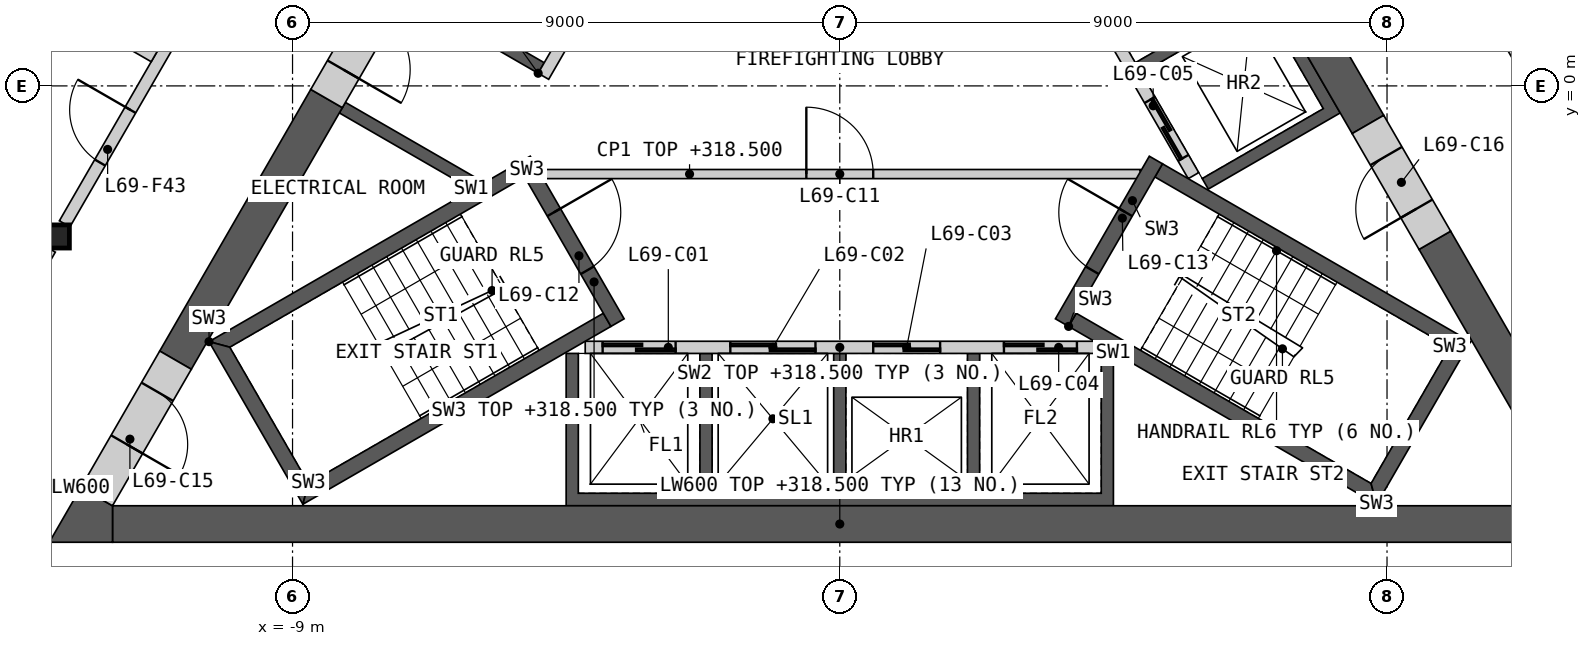
"""IFC4 building model, lengths in metres.
Left out: names, types, materials, properties, quantities, classifications, styles, units other than length and angle.
Written with IfcOpenShell. Run it as: python <this file> out.ifc"""

import sys

from ifc_helpers import new_model, si_unit, direction, frame, frame_2d, origin, origin_2d, place, context, subcontext, project, spatial, polyline, rectangle, i_section, outline, extrude, element, fill, save


model = new_model("IFC4")
c1 = context("Model", 3, precision=1e-05, world=origin(), true_north=direction((0.0, 1.0)))
c2 = subcontext(c1, "Body", "Model", "MODEL_VIEW")
j1 = project(units=[si_unit("LENGTHUNIT", "METRE"), si_unit("PLANEANGLEUNIT", "RADIAN")], contexts=[c1])
p1 = place(None, origin())
s1 = spatial("IfcSite", under=j1, at=p1, CompositionType="ELEMENT")
p2 = place(p1, origin())
s2 = spatial("IfcBuilding", under=s1, at=p2, CompositionType="ELEMENT")
p3 = place(p2, frame((0.0, 0.0, 315.4)))
s3 = spatial("IfcBuildingStorey", under=s2, at=p3, CompositionType="ELEMENT", Elevation=315.4)
p4 = place(p3, frame((-12.868, -2.476, 0.0), z_axis=(0.0, 0.0, 1.0), x_axis=(1.0, 0.0, 0.0)))
e1 = element("IfcColumn", 1, at=p4, inside=s3, PredefinedType="COLUMN", context=c2, shape_type="SweptSolid", body=[
    extrude(i_section(OverallWidth=0.396, OverallDepth=0.381, WebThickness=0.019, FlangeThickness=0.03, at=origin_2d()), origin(), (0.0, 0.0, 1.0), 3.4),
])
p5 = place(p3, origin())
e2 = element("IfcWall", 2, at=p5, inside=s3, PredefinedType="SHEAR", context=c2, shape_type="SweptSolid", body=[
    extrude(outline(polyline([(4.5, -4.4), (4.5, -6.906), (-4.5, -6.906), (-4.5, -4.4), (-4.3, -4.4), (-4.3, -6.7), (-2.3, -6.7), (-2.3, -4.4), (-2.1, -4.4), (-2.1, -6.7), (-0.1, -6.7), (-0.1, -4.4), (0.1, -4.4), (0.1, -6.7), (2.1, -6.7), (2.1, -4.4), (2.3, -4.4), (2.3, -6.7), (4.3, -6.7), (4.3, -4.4), (4.5, -4.4)])), origin(), (0.0, 0.0, 1.0), 3.1),
])
p6 = place(p3, frame((-4.187, -4.3, 0.0), z_axis=(0.0, 0.0, 1.0), x_axis=(1.0, 0.0, 0.0)))
e3 = element("IfcWall", 3, at=p6, inside=s3, PredefinedType="SOLIDWALL", context=c2, shape_type="SweptSolid", body=[
    extrude(rectangle(XDim=8.373, YDim=0.2, at=frame_2d((4.187, 0.0))), origin(), (0.0, 0.0, 1.0), 3.1),
])
p7 = place(p6, frame((0.287, 0.0, 0.0)))
e4 = element("IfcOpeningElement", 4, at=p7, cuts=e3, PredefinedType="OPENING", context=c2, shape_type="SweptSolid", body=[
    extrude(rectangle(XDim=1.2, YDim=2.1, at=frame_2d((0.6, 1.05))), frame((0.0, 0.11, 0.0), z_axis=(0.0, -1.0, 0.0), x_axis=(1.0, 0.0, 0.0)), (0.0, 0.0, 1.0), 0.22),
])
p8 = place(p6, frame((2.387, 0.0, 0.0)))
e5 = element("IfcOpeningElement", 5, at=p8, cuts=e3, PredefinedType="OPENING", context=c2, shape_type="SweptSolid", body=[
    extrude(rectangle(XDim=1.4, YDim=2.1, at=frame_2d((0.7, 1.05))), frame((0.0, 0.11, 0.0), z_axis=(0.0, -1.0, 0.0), x_axis=(1.0, 0.0, 0.0)), (0.0, 0.0, 1.0), 0.22),
])
p9 = place(p6, frame((4.737, 0.0, 0.0)))
e6 = element("IfcOpeningElement", 6, at=p9, cuts=e3, PredefinedType="OPENING", context=c2, shape_type="SweptSolid", body=[
    extrude(rectangle(XDim=1.1, YDim=2.1, at=frame_2d((0.55, 1.05))), frame((0.0, 0.11, 0.0), z_axis=(0.0, -1.0, 0.0), x_axis=(1.0, 0.0, 0.0)), (0.0, 0.0, 1.0), 0.22),
])
p10 = place(p6, frame((6.887, 0.0, 0.0)))
e7 = element("IfcOpeningElement", 7, at=p10, cuts=e3, PredefinedType="OPENING", context=c2, shape_type="SweptSolid", body=[
    extrude(rectangle(XDim=1.2, YDim=2.1, at=frame_2d((0.6, 1.05))), frame((0.0, 0.11, 0.0), z_axis=(0.0, -1.0, 0.0), x_axis=(1.0, 0.0, 0.0)), (0.0, 0.0, 1.0), 0.22),
])
p11 = place(p3, origin())
e8 = element("IfcWall", 8, at=p11, inside=s3, PredefinedType="SHEAR", context=c2, shape_type="SweptSolid", body=[
    extrude(outline(polyline([(1.561, 6.097), (3.731, 7.35), (8.231, -0.444), (6.061, -1.697), (5.96, -1.524), (7.952, -0.374), (6.952, 1.358), (4.96, 0.208), (4.861, 0.381), (6.852, 1.531), (5.852, 3.263), (3.861, 2.113), (3.76, 2.287), (5.752, 3.437), (4.752, 5.169), (2.76, 4.019), (2.66, 4.192), (4.652, 5.342), (3.652, 7.074), (1.66, 5.924), (1.561, 6.097)])), origin(), (0.0, 0.0, 1.0), 3.1),
])
p12 = place(p3, frame((5.817, -1.476, 0.0), z_axis=(0.0, 0.0, 1.0), x_axis=(-0.500002616675, 0.866023893041, 0.0)))
e9 = element("IfcWall", 9, at=p12, inside=s3, PredefinedType="SOLIDWALL", context=c2, shape_type="SweptSolid", body=[
    extrude(rectangle(XDim=8.373, YDim=0.2, at=frame_2d((4.187, 0.0))), origin(), (0.0, 0.0, 1.0), 3.1),
])
p13 = place(p12, frame((0.337, 0.0, 0.0)))
e10 = element("IfcOpeningElement", 10, at=p13, cuts=e9, PredefinedType="OPENING", context=c2, shape_type="SweptSolid", body=[
    extrude(rectangle(XDim=1.1, YDim=2.1, at=frame_2d((0.55, 1.05))), frame((0.0, 0.11, 0.0), z_axis=(0.0, -1.0, 0.0), x_axis=(1.0, 0.0, 0.0)), (0.0, 0.0, 1.0), 0.22),
])
p14 = place(p12, frame((2.537, 0.0, 0.0)))
e11 = element("IfcOpeningElement", 11, at=p14, cuts=e9, PredefinedType="OPENING", context=c2, shape_type="SweptSolid", body=[
    extrude(rectangle(XDim=1.1, YDim=2.1, at=frame_2d((0.55, 1.05))), frame((0.0, 0.11, 0.0), z_axis=(0.0, -1.0, 0.0), x_axis=(1.0, 0.0, 0.0)), (0.0, 0.0, 1.0), 0.22),
])
p15 = place(p12, frame((4.737, 0.0, 0.0)))
e12 = element("IfcOpeningElement", 12, at=p15, cuts=e9, PredefinedType="OPENING", context=c2, shape_type="SweptSolid", body=[
    extrude(rectangle(XDim=1.1, YDim=2.1, at=frame_2d((0.55, 1.05))), frame((0.0, 0.11, 0.0), z_axis=(0.0, -1.0, 0.0), x_axis=(1.0, 0.0, 0.0)), (0.0, 0.0, 1.0), 0.22),
])
p16 = place(p12, frame((7.037, 0.0, 0.0)))
e13 = element("IfcOpeningElement", 13, at=p16, cuts=e9, PredefinedType="OPENING", context=c2, shape_type="SweptSolid", body=[
    extrude(rectangle(XDim=0.9, YDim=2.1, at=frame_2d((0.45, 1.05))), frame((0.0, 0.11, 0.0), z_axis=(0.0, -1.0, 0.0), x_axis=(1.0, 0.0, 0.0)), (0.0, 0.0, 1.0), 0.22),
])
p17 = place(p3, origin())
e14 = element("IfcWall", 14, at=p17, inside=s3, PredefinedType="SHEAR", context=c2, shape_type="SweptSolid", body=[
    extrude(outline(polyline([(-6.061, -1.697), (-8.231, -0.444), (-8.131, -0.271), (-5.96, -1.524), (-6.061, -1.697)])), origin(), (0.0, 0.0, 1.0), 3.1),
])
p18 = place(p3, origin())
e15 = element("IfcWall", 15, at=p18, inside=s3, PredefinedType="SHEAR", context=c2, shape_type="SweptSolid", body=[
    extrude(outline(polyline([(-4.96, 0.208), (-7.131, 1.461), (-3.731, 7.35), (-1.561, 6.097), (-1.66, 5.924), (-3.652, 7.074), (-5.752, 3.437), (-3.76, 2.287), (-3.861, 2.113), (-5.852, 3.263), (-6.852, 1.531), (-4.861, 0.381), (-4.96, 0.208)])), origin(), (0.0, 0.0, 1.0), 3.1),
])
p19 = place(p3, frame((-1.631, 5.776, 0.0), z_axis=(0.0, 0.0, 1.0), x_axis=(-0.499992876559, -0.866029516466, 0.0)))
e16 = element("IfcWall", 16, at=p19, inside=s3, PredefinedType="SOLIDWALL", context=c2, shape_type="SweptSolid", body=[
    extrude(rectangle(XDim=6.486, YDim=0.2, at=frame_2d((3.243, 0.0))), origin(), (0.0, 0.0, 1.0), 3.1),
])
p20 = place(p19, frame((1.537, 0.0, 0.0)))
e17 = element("IfcOpeningElement", 17, at=p20, cuts=e16, PredefinedType="OPENING", context=c2, shape_type="SweptSolid", body=[
    extrude(rectangle(XDim=0.9, YDim=2.1, at=frame_2d((0.45, 1.05))), frame((0.0, 0.11, 0.0), z_axis=(0.0, -1.0, 0.0), x_axis=(1.0, 0.0, 0.0)), (0.0, 0.0, 1.0), 0.22),
])
p21 = place(p19, frame((4.837, 0.0, 0.0)))
e18 = element("IfcOpeningElement", 18, at=p21, cuts=e16, PredefinedType="OPENING", context=c2, shape_type="SweptSolid", body=[
    extrude(rectangle(XDim=0.9, YDim=2.1, at=frame_2d((0.45, 1.05))), frame((0.0, 0.11, 0.0), z_axis=(0.0, -1.0, 0.0), x_axis=(1.0, 0.0, 0.0)), (0.0, 0.0, 1.0), 0.22),
])
p22 = place(p3, frame((-4.941, -1.45, 0.0), z_axis=(0.0, 0.0, 1.0), x_axis=(1.0, 0.0, 0.0)))
e19 = element("IfcWall", 19, at=p22, inside=s3, PredefinedType="PARTITIONING", context=c2, shape_type="SweptSolid", body=[
    extrude(rectangle(XDim=9.882, YDim=0.15, at=frame_2d((4.941, 0.0))), origin(), (0.0, 0.0, 1.0), 3.1),
])
p23 = place(p22, frame((4.391, 0.0, 0.0)))
e20 = element("IfcOpeningElement", 20, at=p23, cuts=e19, PredefinedType="OPENING", context=c2, shape_type="SweptSolid", body=[
    extrude(rectangle(XDim=1.1, YDim=2.1, at=frame_2d((0.55, 1.05))), frame((0.0, 0.085, 0.0), z_axis=(0.0, -1.0, 0.0), x_axis=(1.0, 0.0, 0.0)), (0.0, 0.0, 1.0), 0.17),
])
p24 = place(p3, origin())
e21 = element("IfcWall", 21, at=p24, inside=s3, PredefinedType="SHEAR", context=c2, shape_type="SweptSolid", body=[
    extrude(outline(polyline([(-5.307, -1.281), (-10.374, -4.206), (-10.032, -4.298), (-5.182, -1.498), (-5.307, -1.281)])), origin(), (0.0, 0.0, 1.0), 3.1),
])
p25 = place(p3, origin())
e22 = element("IfcWall", 22, at=p25, inside=s3, PredefinedType="SHEAR", context=c2, shape_type="SweptSolid", body=[
    extrude(outline(polyline([(-10.374, -4.206), (-8.83, -6.881), (-8.738, -6.539), (-10.032, -4.298), (-10.374, -4.206)])), origin(), (0.0, 0.0, 1.0), 3.1),
])
p26 = place(p3, origin())
e23 = element("IfcWall", 23, at=p26, inside=s3, PredefinedType="SHEAR", context=c2, shape_type="SweptSolid", body=[
    extrude(outline(polyline([(-8.738, -6.539), (-8.83, -6.881), (-3.763, -3.956), (-3.888, -3.739), (-8.738, -6.539)])), origin(), (0.0, 0.0, 1.0), 3.1),
])
p27 = place(p3, frame((-5.199, -1.219, 0.0), z_axis=(0.0, 0.0, 1.0), x_axis=(0.499982516597, -0.866035497597, 0.0)))
e24 = element("IfcWall", 24, at=p27, inside=s3, PredefinedType="SHEAR", context=c2, shape_type="SweptSolid", body=[
    extrude(rectangle(XDim=3.088, YDim=0.25, at=frame_2d((1.544, 0.0))), origin(), (0.0, 0.0, 1.0), 3.1),
])
p28 = place(p27, frame((0.994, 0.0, 0.0)))
e25 = element("IfcOpeningElement", 25, at=p28, cuts=e24, PredefinedType="OPENING", context=c2, shape_type="SweptSolid", body=[
    extrude(rectangle(XDim=1.1, YDim=2.1, at=frame_2d((0.55, 1.05))), frame((0.0, 0.135, 0.0), z_axis=(0.0, -1.0, 0.0), x_axis=(1.0, 0.0, 0.0)), (0.0, 0.0, 1.0), 0.27),
])
p29 = place(p3, origin())
e26 = element("IfcWall", 26, at=p29, inside=s3, PredefinedType="SHEAR", context=c2, shape_type="SweptSolid", body=[
    extrude(outline(polyline([(3.763, -3.956), (8.83, -6.881), (8.738, -6.539), (3.888, -3.739), (3.763, -3.956)])), origin(), (0.0, 0.0, 1.0), 3.1),
])
p30 = place(p3, origin())
e27 = element("IfcWall", 27, at=p30, inside=s3, PredefinedType="SHEAR", context=c2, shape_type="SweptSolid", body=[
    extrude(outline(polyline([(8.83, -6.881), (10.374, -4.206), (10.032, -4.298), (8.738, -6.539), (8.83, -6.881)])), origin(), (0.0, 0.0, 1.0), 3.1),
])
p31 = place(p3, origin())
e28 = element("IfcWall", 28, at=p31, inside=s3, PredefinedType="SHEAR", context=c2, shape_type="SweptSolid", body=[
    extrude(outline(polyline([(10.032, -4.298), (10.374, -4.206), (5.307, -1.281), (5.182, -1.498), (10.032, -4.298)])), origin(), (0.0, 0.0, 1.0), 3.1),
])
p32 = place(p3, frame((3.655, -3.893, 0.0), z_axis=(0.0, 0.0, 1.0), x_axis=(0.499982516597, 0.866035497597, 0.0)))
e29 = element("IfcWall", 29, at=p32, inside=s3, PredefinedType="SHEAR", context=c2, shape_type="SweptSolid", body=[
    extrude(rectangle(XDim=3.088, YDim=0.25, at=frame_2d((1.544, 0.0))), origin(), (0.0, 0.0, 1.0), 3.1),
])
p33 = place(p32, frame((0.994, 0.0, 0.0)))
e30 = element("IfcOpeningElement", 30, at=p33, cuts=e29, PredefinedType="OPENING", context=c2, shape_type="SweptSolid", body=[
    extrude(rectangle(XDim=1.1, YDim=2.1, at=frame_2d((0.55, 1.05))), frame((0.0, 0.135, 0.0), z_axis=(0.0, -1.0, 0.0), x_axis=(1.0, 0.0, 0.0)), (0.0, 0.0, 1.0), 0.27),
])
p34 = place(p3, frame((-11.961, -7.206, 0.0), z_axis=(0.0, 0.0, 1.0), x_axis=(1.0, 0.0, 0.0)))
e31 = element("IfcWall", 31, at=p34, inside=s3, PredefinedType="SHEAR", context=c2, shape_type="SweptSolid", body=[
    extrude(rectangle(XDim=23.921, YDim=0.6, at=frame_2d((11.961, 0.0))), origin(), (0.0, 0.0, 1.0), 3.1),
])
p35 = place(p3, frame((8.686, -0.634, 0.0), z_axis=(0.0, 0.0, 1.0), x_axis=(-0.50001836461, 0.866014800712, 0.0)))
e32 = element("IfcWall", 32, at=p35, inside=s3, PredefinedType="SHEAR", context=c2, shape_type="SweptSolid", body=[
    extrude(rectangle(XDim=10.451, YDim=0.6, at=frame_2d((5.225, 0.0))), origin(), (0.0, 0.0, 1.0), 3.1),
])
p36 = place(p3, frame((12.221, -6.756, 0.0), z_axis=(0.0, 0.0, 1.0), x_axis=(-0.50000604952, 0.866021911064, 0.0)))
e33 = element("IfcWall", 33, at=p36, inside=s3, PredefinedType="SHEAR", context=c2, shape_type="SweptSolid", body=[
    extrude(rectangle(XDim=4.869, YDim=0.6, at=frame_2d((2.434, 0.0))), origin(), (0.0, 0.0, 1.0), 3.1),
])
p37 = place(p3, frame((-8.44, -0.208, 0.0), z_axis=(0.0, 0.0, 1.0), x_axis=(-0.500007425856, -0.866021116422, 0.0)))
e34 = element("IfcWall", 34, at=p37, inside=s3, PredefinedType="SHEAR", context=c2, shape_type="SweptSolid", body=[
    extrude(rectangle(XDim=4.969, YDim=0.6, at=frame_2d((2.484, 0.0))), origin(), (0.0, 0.0, 1.0), 3.1),
])
p38 = place(p3, origin())
e35 = element("IfcWall", 35, at=p38, inside=s3, PredefinedType="SHEAR", context=c2, shape_type="SweptSolid", body=[
    extrude(outline(polyline([(-12.48, -6.606), (-11.961, -6.906), (-11.961, -7.506), (-13.0, -7.506), (-12.48, -6.606)])), origin(), (0.0, 0.0, 1.0), 3.1),
])
p39 = place(p3, frame((-10.925, -4.511, 0.0), z_axis=(0.0, 0.0, 1.0), x_axis=(-0.500018667571, -0.866014625789, 0.0)))
e36 = element("IfcWall", 36, at=p39, inside=s3, PredefinedType="SHEAR", context=c2, shape_type="SweptSolid", body=[
    extrude(rectangle(XDim=2.592, YDim=0.6, at=frame_2d((1.296, 0.0))), origin(), (0.0, 0.0, 1.0), 3.1),
])
p40 = place(p39, frame((0.6, 0.0, 0.0)))
e37 = element("IfcOpeningElement", 37, at=p40, cuts=e36, PredefinedType="OPENING", context=c2, shape_type="SweptSolid", body=[
    extrude(rectangle(XDim=1.0, YDim=2.1, at=frame_2d((0.5, 1.05))), frame((0.0, 0.31, 0.0), z_axis=(0.0, -1.0, 0.0), x_axis=(1.0, 0.0, 0.0)), (0.0, 0.0, 1.0), 0.62),
])
p41 = place(p3, frame((9.786, -2.539, 0.0), z_axis=(0.0, 0.0, 1.0), x_axis=(-0.499981787252, 0.866035918664, 0.0)))
e38 = element("IfcWall", 38, at=p41, inside=s3, PredefinedType="SHEAR", context=c2, shape_type="SweptSolid", body=[
    extrude(rectangle(XDim=2.2, YDim=0.6, at=frame_2d((1.1, 0.0))), origin(), (0.0, 0.0, 1.0), 3.1),
])
p42 = place(p41, frame((0.6, 0.0, 0.0)))
e39 = element("IfcOpeningElement", 39, at=p42, cuts=e38, PredefinedType="OPENING", context=c2, shape_type="SweptSolid", body=[
    extrude(rectangle(XDim=1.0, YDim=2.1, at=frame_2d((0.5, 1.05))), frame((0.0, 0.31, 0.0), z_axis=(0.0, -1.0, 0.0), x_axis=(1.0, 0.0, 0.0)), (0.0, 0.0, 1.0), 0.62),
])
p43 = place(p3, frame((-7.34, 1.698, 0.0), z_axis=(0.0, 0.0, 1.0), x_axis=(-0.50002983664, -0.866008176907, 0.0)))
e40 = element("IfcWall", 40, at=p43, inside=s3, PredefinedType="SHEAR", context=c2, shape_type="SweptSolid", body=[
    extrude(rectangle(XDim=2.2, YDim=0.6, at=frame_2d((1.1, 0.0))), origin(), (0.0, 0.0, 1.0), 3.1),
])
p44 = place(p43, frame((0.55, 0.0, 0.0)))
e41 = element("IfcOpeningElement", 41, at=p44, cuts=e40, PredefinedType="OPENING", context=c2, shape_type="SweptSolid", body=[
    extrude(rectangle(XDim=1.1, YDim=2.1, at=frame_2d((0.55, 1.05))), frame((0.0, 0.31, 0.0), z_axis=(0.0, -1.0, 0.0), x_axis=(1.0, 0.0, 0.0)), (0.0, 0.0, 1.0), 0.62),
])
p45 = place(p3, frame((8.698, 4.745, 0.0), z_axis=(0.0, 0.0, 1.0), x_axis=(0.499984266882, -0.866034487114, 0.0)))
e42 = element("IfcWall", 42, at=p45, inside=s3, PredefinedType="PARTITIONING", context=c2, shape_type="SweptSolid", body=[
    extrude(rectangle(XDim=8.099, YDim=0.2, at=frame_2d((4.049, 0.0))), origin(), (0.0, 0.0, 1.0), 3.1),
])
p46 = place(p3, frame((-12.748, -2.269, 0.0), z_axis=(0.0, 0.0, 1.0), x_axis=(0.499984266882, 0.866034487114, 0.0)))
e43 = element("IfcWall", 43, at=p46, inside=s3, PredefinedType="PARTITIONING", context=c2, shape_type="SweptSolid", body=[
    extrude(rectangle(XDim=8.099, YDim=0.2, at=frame_2d((4.049, 0.0))), origin(), (0.0, 0.0, 1.0), 3.1),
])
p47 = place(p46, frame((1.164, 0.0, 0.0)))
e44 = element("IfcOpeningElement", 44, at=p47, cuts=e43, PredefinedType="OPENING", context=c2, shape_type="SweptSolid", body=[
    extrude(rectangle(XDim=1.0, YDim=2.1, at=frame_2d((0.5, 1.05))), frame((0.0, 0.11, 0.0), z_axis=(0.0, -1.0, 0.0), x_axis=(1.0, 0.0, 0.0)), (0.0, 0.0, 1.0), 0.22),
])
p48 = place(p3, frame((-16.055, 3.273, 0.0), z_axis=(0.0, 0.0, 1.0), x_axis=(0.866019581949, -0.500010083578, 0.0)))
e45 = element("IfcWall", 45, at=p48, inside=s3, PredefinedType="PARTITIONING", context=c2, shape_type="SweptSolid", body=[
    extrude(rectangle(XDim=5.535, YDim=0.25, at=frame_2d((2.768, 0.0))), origin(), (0.0, 0.0, 1.0), 2.33),
])
p49 = place(p3, frame((-15.131, -6.397, 0.0), z_axis=(0.0, 0.0, 1.0), x_axis=(0.500003406062, 0.866023437285, 0.0)))
e46 = element("IfcWall", 46, at=p49, inside=s3, PredefinedType="PARTITIONING", context=c2, shape_type="SweptSolid", body=[
    extrude(rectangle(XDim=4.288, YDim=0.2, at=frame_2d((2.144, 0.0))), origin(), (0.0, 0.0, 1.0), 3.1),
])
p50 = place(p7, origin())
e47 = element("IfcDoor", 47, at=p50, inside=s3, OperationType="SLIDING_TO_LEFT", PredefinedType="DOOR", context=c2, shape_type="SweptSolid", body=[
    extrude(rectangle(XDim=1.2, YDim=2.1, at=frame_2d((0.6, 1.05))), frame((0.0, 0.025, 0.0), z_axis=(0.0, -1.0, 0.0), x_axis=(1.0, 0.0, 0.0)), (0.0, 0.0, 1.0), 0.05),
])
fill(e4, e47)
p51 = place(p8, origin())
e48 = element("IfcDoor", 48, at=p51, inside=s3, OperationType="SLIDING_TO_LEFT", PredefinedType="DOOR", context=c2, shape_type="SweptSolid", body=[
    extrude(rectangle(XDim=1.4, YDim=2.1, at=frame_2d((0.7, 1.05))), frame((0.0, 0.025, 0.0), z_axis=(0.0, -1.0, 0.0), x_axis=(1.0, 0.0, 0.0)), (0.0, 0.0, 1.0), 0.05),
])
fill(e5, e48)
p52 = place(p9, origin())
e49 = element("IfcDoor", 49, at=p52, inside=s3, OperationType="SLIDING_TO_LEFT", PredefinedType="DOOR", context=c2, shape_type="SweptSolid", body=[
    extrude(rectangle(XDim=1.1, YDim=2.1, at=frame_2d((0.55, 1.05))), frame((0.0, 0.025, 0.0), z_axis=(0.0, -1.0, 0.0), x_axis=(1.0, 0.0, 0.0)), (0.0, 0.0, 1.0), 0.05),
])
fill(e6, e49)
p53 = place(p10, origin())
e50 = element("IfcDoor", 50, at=p53, inside=s3, OperationType="SLIDING_TO_LEFT", PredefinedType="DOOR", context=c2, shape_type="SweptSolid", body=[
    extrude(rectangle(XDim=1.2, YDim=2.1, at=frame_2d((0.6, 1.05))), frame((0.0, 0.025, 0.0), z_axis=(0.0, -1.0, 0.0), x_axis=(1.0, 0.0, 0.0)), (0.0, 0.0, 1.0), 0.05),
])
fill(e7, e50)
p54 = place(p13, origin())
e51 = element("IfcDoor", 51, at=p54, inside=s3, OperationType="SLIDING_TO_LEFT", PredefinedType="DOOR", context=c2, shape_type="SweptSolid", body=[
    extrude(rectangle(XDim=1.1, YDim=2.1, at=frame_2d((0.55, 1.05))), frame((0.0, 0.025, 0.0), z_axis=(0.0, -1.0, 0.0), x_axis=(1.0, 0.0, 0.0)), (0.0, 0.0, 1.0), 0.05),
])
fill(e10, e51)
p55 = place(p23, origin())
e52 = element("IfcDoor", 52, at=p55, inside=s3, OperationType="SINGLE_SWING_LEFT", PredefinedType="DOOR", context=c2, shape_type="SweptSolid", body=[
    extrude(rectangle(XDim=1.1, YDim=2.1, at=frame_2d((0.55, 1.05))), frame((0.0, 0.025, 0.0), z_axis=(0.0, -1.0, 0.0), x_axis=(1.0, 0.0, 0.0)), (0.0, 0.0, 1.0), 0.05),
])
fill(e20, e52)
p56 = place(p28, origin())
e53 = element("IfcDoor", 53, at=p56, inside=s3, OperationType="SINGLE_SWING_LEFT", PredefinedType="DOOR", context=c2, shape_type="SweptSolid", body=[
    extrude(rectangle(XDim=1.1, YDim=2.1, at=frame_2d((0.55, 1.05))), frame((0.0, 0.025, 0.0), z_axis=(0.0, -1.0, 0.0), x_axis=(1.0, 0.0, 0.0)), (0.0, 0.0, 1.0), 0.05),
])
fill(e25, e53)
p57 = place(p33, origin())
e54 = element("IfcDoor", 54, at=p57, inside=s3, OperationType="SINGLE_SWING_RIGHT", PredefinedType="DOOR", context=c2, shape_type="SweptSolid", body=[
    extrude(rectangle(XDim=1.1, YDim=2.1, at=frame_2d((0.55, 1.05))), frame((0.0, 0.025, 0.0), z_axis=(0.0, -1.0, 0.0), x_axis=(1.0, 0.0, 0.0)), (0.0, 0.0, 1.0), 0.05),
])
fill(e30, e54)
p58 = place(p40, origin())
e55 = element("IfcDoor", 55, at=p58, inside=s3, OperationType="SINGLE_SWING_RIGHT", PredefinedType="DOOR", context=c2, shape_type="SweptSolid", body=[
    extrude(rectangle(XDim=1.0, YDim=2.1, at=frame_2d((0.5, 1.05))), frame((0.0, 0.055, 0.0), z_axis=(0.0, -1.0, 0.0), x_axis=(1.0, 0.0, 0.0)), (0.0, 0.0, 1.0), 0.05),
])
fill(e37, e55)
p59 = place(p42, origin())
e56 = element("IfcDoor", 56, at=p59, inside=s3, OperationType="SINGLE_SWING_LEFT", PredefinedType="DOOR", context=c2, shape_type="SweptSolid", body=[
    extrude(rectangle(XDim=1.0, YDim=2.1, at=frame_2d((0.5, 1.05))), frame((0.0, 0.055, 0.0), z_axis=(0.0, -1.0, 0.0), x_axis=(1.0, 0.0, 0.0)), (0.0, 0.0, 1.0), 0.05),
])
fill(e39, e56)
p60 = place(p44, origin())
e57 = element("IfcDoor", 57, at=p60, inside=s3, OperationType="SINGLE_SWING_RIGHT", PredefinedType="DOOR", context=c2, shape_type="SweptSolid", body=[
    extrude(rectangle(XDim=1.1, YDim=2.1, at=frame_2d((0.55, 1.05))), frame((0.0, 0.055, 0.0), z_axis=(0.0, -1.0, 0.0), x_axis=(1.0, 0.0, 0.0)), (0.0, 0.0, 1.0), 0.05),
])
fill(e41, e57)
p61 = place(p47, origin())
e58 = element("IfcDoor", 58, at=p61, inside=s3, OperationType="SINGLE_SWING_RIGHT", PredefinedType="DOOR", context=c2, shape_type="SweptSolid", body=[
    extrude(rectangle(XDim=1.0, YDim=2.1, at=frame_2d((0.5, 1.05))), frame((0.0, 0.025, 0.0), z_axis=(0.0, -1.0, 0.0), x_axis=(1.0, 0.0, 0.0)), (0.0, 0.0, 1.0), 0.05),
])
fill(e44, e58)
save(model, sys.argv[1])
